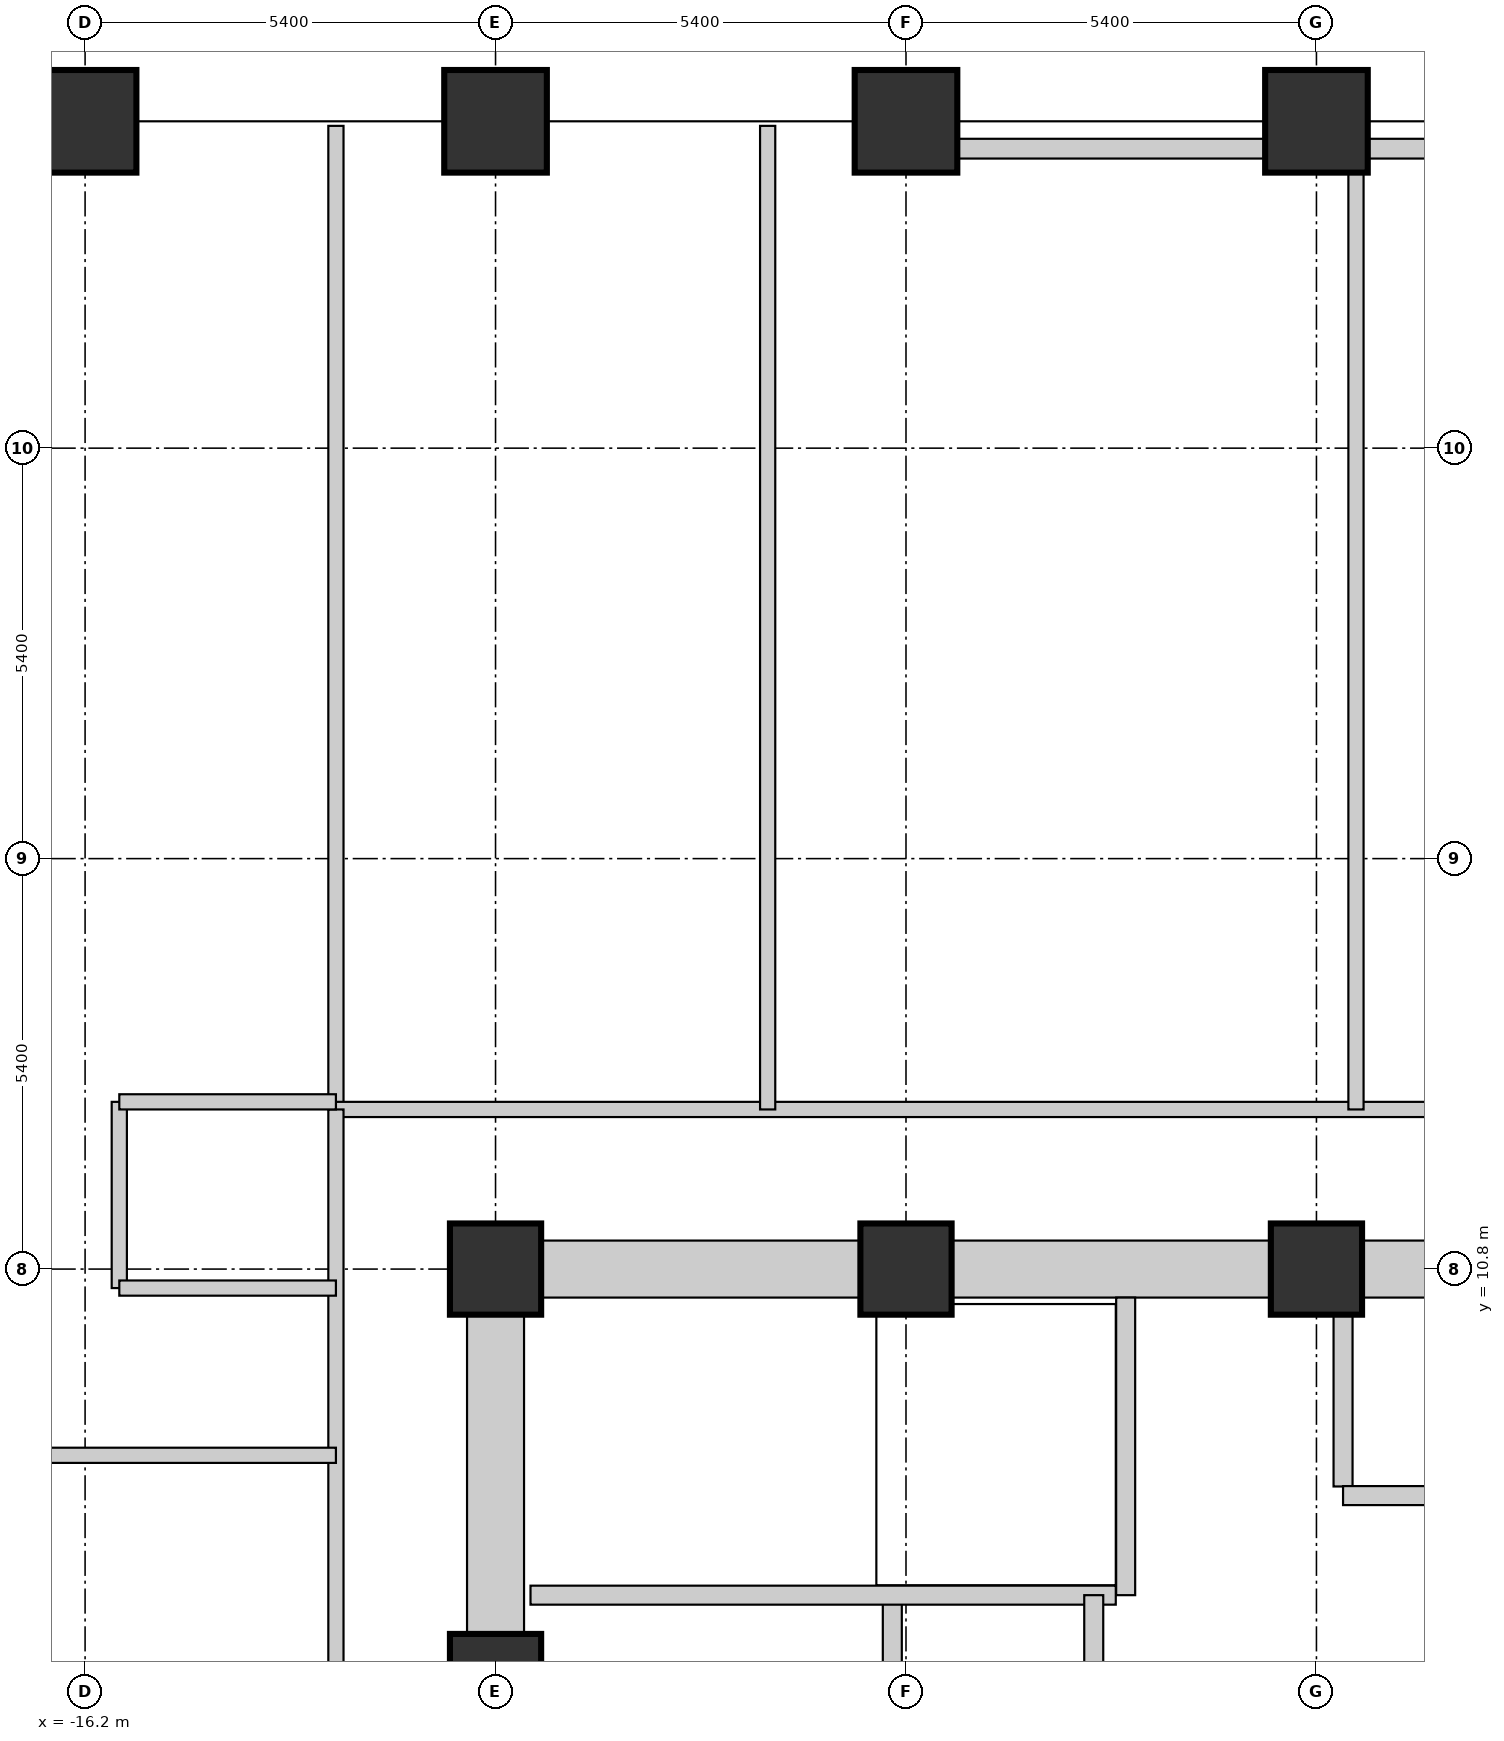
"""IFC4 building model, lengths in metres.
Left out: names, types, materials, properties, quantities, classifications, styles, units other than length and angle.
Written with IfcOpenShell. Run it as: python <this file> out.ifc"""

import sys

from ifc_helpers import new_model, si_unit, direction, frame, frame_2d, origin, origin_2d, place, context, subcontext, project, spatial, rectangle, extrude, element, fill, save


model = new_model("IFC4")
c1 = context("Model", 3, precision=1e-05, world=origin(), true_north=direction((0.0, 1.0)))
c2 = subcontext(c1, "Body", "Model", "MODEL_VIEW")
j1 = project(units=[si_unit("LENGTHUNIT", "METRE"), si_unit("PLANEANGLEUNIT", "RADIAN")], contexts=[c1])
p1 = place(None, origin())
s1 = spatial("IfcSite", under=j1, at=p1, CompositionType="ELEMENT")
p2 = place(p1, origin())
s2 = spatial("IfcBuilding", under=s1, at=p2, CompositionType="ELEMENT")
p3 = place(p2, frame((0.0, 0.0, 22.5)))
s3 = spatial("IfcBuildingStorey", under=s2, at=p3, CompositionType="ELEMENT", Elevation=22.5)
p4 = place(p3, frame((-16.2, 25.9, 0.0), z_axis=(0.0, 0.0, 1.0), x_axis=(1.0, 0.0, 0.0)))
e1 = element("IfcColumn", 1, at=p4, inside=s3, PredefinedType="COLUMN", context=c2, shape_type="SweptSolid", body=[
    extrude(rectangle(XDim=1.35, YDim=1.35, at=origin_2d()), origin(), (0.0, 0.0, 1.0), 3.75),
])
for number, where, z_axis, x_axis in (
    (2, (-10.8, 5.4, 0.0), (0.0, 0.0, 1.0), (1.0, 0.0, 0.0)),
    (3, (-10.8, 10.8, 0.0), (0.0, 0.0, 1.0), (1.0, 0.0, 0.0)),
):
    element("IfcColumn", number, at=place(p3, frame(where, z_axis=z_axis, x_axis=x_axis)), inside=s3, PredefinedType="COLUMN", context=c2, shape_type="SweptSolid", body=[
        extrude(rectangle(XDim=1.2, YDim=1.2, at=origin_2d()), origin(), (0.0, 0.0, 1.0), 3.75),
    ])
p5 = place(p3, frame((-10.8, 25.9, 0.0), z_axis=(0.0, 0.0, 1.0), x_axis=(1.0, 0.0, 0.0)))
e4 = element("IfcColumn", 4, at=p5, inside=s3, PredefinedType="COLUMN", context=c2, shape_type="SweptSolid", body=[
    extrude(rectangle(XDim=1.35, YDim=1.35, at=origin_2d()), origin(), (0.0, 0.0, 1.0), 3.75),
])
p6 = place(p3, frame((-5.4, 10.8, 0.0), z_axis=(0.0, 0.0, 1.0), x_axis=(1.0, 0.0, 0.0)))
e5 = element("IfcColumn", 5, at=p6, inside=s3, PredefinedType="COLUMN", context=c2, shape_type="SweptSolid", body=[
    extrude(rectangle(XDim=1.2, YDim=1.2, at=origin_2d()), origin(), (0.0, 0.0, 1.0), 3.75),
])
p7 = place(p3, frame((-5.4, 25.9, 0.0), z_axis=(0.0, 0.0, 1.0), x_axis=(1.0, 0.0, 0.0)))
e6 = element("IfcColumn", 6, at=p7, inside=s3, PredefinedType="COLUMN", context=c2, shape_type="SweptSolid", body=[
    extrude(rectangle(XDim=1.35, YDim=1.35, at=origin_2d()), origin(), (0.0, 0.0, 1.0), 3.75),
])
p8 = place(p3, frame((0.0, 10.8, 0.0), z_axis=(0.0, 0.0, 1.0), x_axis=(1.0, 0.0, 0.0)))
e7 = element("IfcColumn", 7, at=p8, inside=s3, PredefinedType="COLUMN", context=c2, shape_type="SweptSolid", body=[
    extrude(rectangle(XDim=1.2, YDim=1.2, at=origin_2d()), origin(), (0.0, 0.0, 1.0), 3.75),
])
p9 = place(p3, frame((0.0, 25.9, 0.0), z_axis=(0.0, 0.0, 1.0), x_axis=(1.0, 0.0, 0.0)))
e8 = element("IfcColumn", 8, at=p9, inside=s3, PredefinedType="COLUMN", context=c2, shape_type="SweptSolid", body=[
    extrude(rectangle(XDim=1.35, YDim=1.35, at=origin_2d()), origin(), (0.0, 0.0, 1.0), 3.75),
])
p10 = place(p3, frame((-10.19, 10.8, 0.0), z_axis=(0.0, 0.0, 1.0), x_axis=(1.0, 0.0, 0.0)))
e9 = element("IfcWall", 9, at=p10, inside=s3, PredefinedType="SHEAR", context=c2, shape_type="SweptSolid", body=[
    extrude(rectangle(XDim=4.18, YDim=0.75, at=frame_2d((2.09, 0.0))), origin(), (0.0, 0.0, 1.0), 3.75),
])
p11 = place(p3, frame((-4.79, 10.8, 0.0), z_axis=(0.0, 0.0, 1.0), x_axis=(1.0, 0.0, 0.0)))
e10 = element("IfcWall", 10, at=p11, inside=s3, PredefinedType="SHEAR", context=c2, shape_type="SweptSolid", body=[
    extrude(rectangle(XDim=4.18, YDim=0.75, at=frame_2d((2.09, 0.0))), origin(), (0.0, 0.0, 1.0), 3.75),
])
p12 = place(p11, frame((2.83, 0.0, 0.0)))
e11 = element("IfcOpeningElement", 11, at=p12, cuts=e10, PredefinedType="OPENING", context=c2, shape_type="SweptSolid", body=[
    extrude(rectangle(XDim=1.1, YDim=2.1, at=frame_2d((0.55, 1.05))), frame((0.0, 0.385, 0.0), z_axis=(0.0, -1.0, 0.0), x_axis=(1.0, 0.0, 0.0)), (0.0, 0.0, 1.0), 0.77),
])
for number, where, z_axis, x_axis in (
    (12, (0.61, 10.8, 0.0), (0.0, 0.0, 1.0), (1.0, 0.0, 0.0)),
    (13, (-10.8, 6.01, 0.0), (0.0, 0.0, 1.0), (0.0, 1.0, 0.0)),
):
    element("IfcWall", number, at=place(p3, frame(where, z_axis=z_axis, x_axis=x_axis)), inside=s3, PredefinedType="SHEAR", context=c2, shape_type="SweptSolid", body=[
        extrude(rectangle(XDim=4.18, YDim=0.75, at=frame_2d((2.09, 0.0))), origin(), (0.0, 0.0, 1.0), 3.75),
    ])
for number, where, z_axis, x_axis in (
    (14, (-0.673, 25.54, 0.0), (0.0, 0.0, 1.0), (-1.0, 0.0, 0.0)),
    (15, (4.727, 25.54, 0.0), (0.0, 0.0, 1.0), (-1.0, 0.0, 0.0)),
):
    element("IfcWall", number, at=place(p3, frame(where, z_axis=z_axis, x_axis=x_axis)), inside=s3, PredefinedType="STANDARD", context=c2, shape_type="SweptSolid", body=[
        extrude(rectangle(XDim=4.054, YDim=0.26, at=frame_2d((2.027, 0.0))), origin(), (0.0, 0.0, 1.0), 2.629),
    ])
p13 = place(p3, frame((-5.58, 0.72, 0.0), z_axis=(0.0, 0.0, 1.0), x_axis=(0.0, 1.0, 0.0)))
e16 = element("IfcWall", 16, at=p13, inside=s3, PredefinedType="SHEAR", context=c2, shape_type="SweptSolid", body=[
    extrude(rectangle(XDim=5.79, YDim=0.25, at=frame_2d((2.895, 0.0))), origin(), (0.0, 0.0, 1.0), 3.75),
])
p14 = place(p13, frame((3.35, 0.0, 0.0)))
e17 = element("IfcOpeningElement", 17, at=p14, cuts=e16, PredefinedType="OPENING", context=c2, shape_type="SweptSolid", body=[
    extrude(rectangle(XDim=1.1, YDim=2.1, at=frame_2d((0.55, 1.05))), frame((0.0, 0.135, 0.0), z_axis=(0.0, -1.0, 0.0), x_axis=(1.0, 0.0, 0.0)), (0.0, 0.0, 1.0), 0.27),
])
p15 = place(p3, frame((0.35, 7.94, 0.0), z_axis=(0.0, 0.0, 1.0), x_axis=(0.0, 1.0, 0.0)))
e18 = element("IfcWall", 18, at=p15, inside=s3, PredefinedType="SHEAR", context=c2, shape_type="SweptSolid", body=[
    extrude(rectangle(XDim=2.26, YDim=0.25, at=frame_2d((1.13, 0.0))), origin(), (0.0, 0.0, 1.0), 3.75),
])
p16 = place(p3, frame((0.35, 7.82, 0.0), z_axis=(0.0, 0.0, 1.0), x_axis=(1.0, 0.0, 0.0)))
e19 = element("IfcWall", 19, at=p16, inside=s3, PredefinedType="SHEAR", context=c2, shape_type="SweptSolid", body=[
    extrude(rectangle(XDim=10.075, YDim=0.25, at=frame_2d((5.038, 0.0))), origin(), (0.0, 0.0, 1.0), 3.75),
])
p17 = place(p16, frame((0.7, 0.0, 0.0)))
e20 = element("IfcOpeningElement", 20, at=p17, cuts=e19, PredefinedType="OPENING", context=c2, shape_type="SweptSolid", body=[
    extrude(rectangle(XDim=1.1, YDim=2.1, at=frame_2d((0.55, 1.05))), frame((0.0, 0.135, 0.0), z_axis=(0.0, -1.0, 0.0), x_axis=(1.0, 0.0, 0.0)), (0.0, 0.0, 1.0), 0.27),
])
p18 = place(p16, frame((3.2, 0.0, 0.0)))
e21 = element("IfcOpeningElement", 21, at=p18, cuts=e19, PredefinedType="OPENING", context=c2, shape_type="SweptSolid", body=[
    extrude(rectangle(XDim=1.1, YDim=2.1, at=frame_2d((0.55, 1.05))), frame((0.0, 0.135, 0.0), z_axis=(0.0, -1.0, 0.0), x_axis=(1.0, 0.0, 0.0)), (0.0, 0.0, 1.0), 0.27),
])
p19 = place(p16, frame((5.7, 0.0, 0.0)))
e22 = element("IfcOpeningElement", 22, at=p19, cuts=e19, PredefinedType="OPENING", context=c2, shape_type="SweptSolid", body=[
    extrude(rectangle(XDim=1.1, YDim=2.1, at=frame_2d((0.55, 1.05))), frame((0.0, 0.135, 0.0), z_axis=(0.0, -1.0, 0.0), x_axis=(1.0, 0.0, 0.0)), (0.0, 0.0, 1.0), 0.27),
])
p20 = place(p16, frame((8.2, 0.0, 0.0)))
e23 = element("IfcOpeningElement", 23, at=p20, cuts=e19, PredefinedType="OPENING", context=c2, shape_type="SweptSolid", body=[
    extrude(rectangle(XDim=1.1, YDim=2.1, at=frame_2d((0.55, 1.05))), frame((0.0, 0.135, 0.0), z_axis=(0.0, -1.0, 0.0), x_axis=(1.0, 0.0, 0.0)), (0.0, 0.0, 1.0), 0.27),
])
p21 = place(p3, frame((-2.51, 6.51, 0.0), z_axis=(0.0, 0.0, 1.0), x_axis=(0.0, 1.0, 0.0)))
e24 = element("IfcWall", 24, at=p21, inside=s3, PredefinedType="SHEAR", context=c2, shape_type="SweptSolid", body=[
    extrude(rectangle(XDim=3.915, YDim=0.25, at=frame_2d((1.958, 0.0))), origin(), (0.0, 0.0, 1.0), 3.75),
])
p22 = place(p3, frame((-10.34, 6.51, 0.0), z_axis=(0.0, 0.0, 1.0), x_axis=(1.0, 0.0, 0.0)))
e25 = element("IfcWall", 25, at=p22, inside=s3, PredefinedType="SHEAR", context=c2, shape_type="SweptSolid", body=[
    extrude(rectangle(XDim=7.7, YDim=0.25, at=frame_2d((3.85, 0.0))), origin(), (0.0, 0.0, 1.0), 3.75),
])
p23 = place(p22, frame((0.35, 0.0, 0.0)))
e26 = element("IfcOpeningElement", 26, at=p23, cuts=e25, PredefinedType="OPENING", context=c2, shape_type="SweptSolid", body=[
    extrude(rectangle(XDim=1.1, YDim=2.1, at=frame_2d((0.55, 1.05))), frame((0.0, 0.135, 0.0), z_axis=(0.0, -1.0, 0.0), x_axis=(1.0, 0.0, 0.0)), (0.0, 0.0, 1.0), 0.27),
])
p24 = place(p3, frame((-2.93, 0.68, 0.0), z_axis=(0.0, 0.0, 1.0), x_axis=(0.0, 1.0, 0.0)))
e27 = element("IfcWall", 27, at=p24, inside=s3, PredefinedType="SHEAR", context=c2, shape_type="SweptSolid", body=[
    extrude(rectangle(XDim=5.83, YDim=0.25, at=frame_2d((2.915, 0.0))), origin(), (0.0, 0.0, 1.0), 3.75),
])
p25 = place(p24, frame((0.75, 0.0, 0.0)))
e28 = element("IfcOpeningElement", 28, at=p25, cuts=e27, PredefinedType="OPENING", context=c2, shape_type="SweptSolid", body=[
    extrude(rectangle(XDim=1.2, YDim=2.1, at=frame_2d((0.6, 1.05))), frame((0.0, 0.135, 0.0), z_axis=(0.0, -1.0, 0.0), x_axis=(1.0, 0.0, 0.0)), (0.0, 0.0, 1.0), 0.27),
])
p26 = place(p3, frame((-12.9, 12.9, 0.0), z_axis=(0.0, 0.0, 1.0), x_axis=(0.0, 1.0, 0.0)))
e29 = element("IfcWall", 29, at=p26, inside=s3, PredefinedType="PARTITIONING", context=c2, shape_type="SweptSolid", body=[
    extrude(rectangle(XDim=12.94, YDim=0.2, at=frame_2d((6.47, 0.0))), origin(), (0.0, 0.0, 1.0), 2.629),
])
p27 = place(p3, frame((-12.9, 12.9, 0.0), z_axis=(0.0, 0.0, 1.0), x_axis=(1.0, 0.0, 0.0)))
e30 = element("IfcWall", 30, at=p27, inside=s3, PredefinedType="PARTITIONING", context=c2, shape_type="SweptSolid", body=[
    extrude(rectangle(XDim=25.8, YDim=0.2, at=frame_2d((12.9, 0.0))), origin(), (0.0, 0.0, 1.0), 2.93),
])
p28 = place(p27, frame((4.347, 0.0, 0.0)))
e31 = element("IfcOpeningElement", 31, at=p28, cuts=e30, PredefinedType="OPENING", context=c2, shape_type="SweptSolid", body=[
    extrude(rectangle(XDim=0.85, YDim=2.1, at=frame_2d((0.425, 1.05))), frame((0.0, 0.11, 0.0), z_axis=(0.0, -1.0, 0.0), x_axis=(1.0, 0.0, 0.0)), (0.0, 0.0, 1.0), 0.22),
])
p29 = place(p27, frame((9.1, 0.0, 0.0)))
e32 = element("IfcOpeningElement", 32, at=p29, cuts=e30, PredefinedType="OPENING", context=c2, shape_type="SweptSolid", body=[
    extrude(rectangle(XDim=0.85, YDim=2.1, at=frame_2d((0.425, 1.05))), frame((0.0, 0.11, 0.0), z_axis=(0.0, -1.0, 0.0), x_axis=(1.0, 0.0, 0.0)), (0.0, 0.0, 1.0), 0.22),
])
p30 = place(p27, frame((19.16, 0.0, 0.0)))
e33 = element("IfcOpeningElement", 33, at=p30, cuts=e30, PredefinedType="OPENING", context=c2, shape_type="SweptSolid", body=[
    extrude(rectangle(XDim=0.95, YDim=2.1, at=frame_2d((0.475, 1.05))), frame((0.0, 0.11, 0.0), z_axis=(0.0, -1.0, 0.0), x_axis=(1.0, 0.0, 0.0)), (0.0, 0.0, 1.0), 0.22),
])
p31 = place(p3, frame((-12.9, -12.9, 0.0), z_axis=(0.0, 0.0, 1.0), x_axis=(0.0, 1.0, 0.0)))
e34 = element("IfcWall", 34, at=p31, inside=s3, PredefinedType="PARTITIONING", context=c2, shape_type="SweptSolid", body=[
    extrude(rectangle(XDim=25.8, YDim=0.2, at=frame_2d((12.9, 0.0))), origin(), (0.0, 0.0, 1.0), 3.57),
])
p32 = place(p31, frame((0.28, 0.0, 0.0)))
e35 = element("IfcOpeningElement", 35, at=p32, cuts=e34, PredefinedType="OPENING", context=c2, shape_type="SweptSolid", body=[
    extrude(rectangle(XDim=0.95, YDim=2.1, at=frame_2d((0.475, 1.05))), frame((0.0, 0.11, 0.0), z_axis=(0.0, -1.0, 0.0), x_axis=(1.0, 0.0, 0.0)), (0.0, 0.0, 1.0), 0.22),
])
p33 = place(p31, frame((24.205, 0.0, 0.0)))
e36 = element("IfcOpeningElement", 36, at=p33, cuts=e34, PredefinedType="OPENING", context=c2, shape_type="SweptSolid", body=[
    extrude(rectangle(XDim=0.85, YDim=2.1, at=frame_2d((0.425, 1.05))), frame((0.0, 0.11, 0.0), z_axis=(0.0, -1.0, 0.0), x_axis=(1.0, 0.0, 0.0)), (0.0, 0.0, 1.0), 0.22),
])
p34 = place(p31, frame((21.87, 0.0, 0.0)))
e37 = element("IfcOpeningElement", 37, at=p34, cuts=e34, PredefinedType="OPENING", context=c2, shape_type="SweptSolid", body=[
    extrude(rectangle(XDim=0.95, YDim=2.1, at=frame_2d((0.475, 1.05))), frame((0.0, 0.11, 0.0), z_axis=(0.0, -1.0, 0.0), x_axis=(1.0, 0.0, 0.0)), (0.0, 0.0, 1.0), 0.22),
])
p35 = place(p31, frame((5.16, 0.0, 0.0)))
e38 = element("IfcOpeningElement", 38, at=p35, cuts=e34, PredefinedType="OPENING", context=c2, shape_type="SweptSolid", body=[
    extrude(rectangle(XDim=0.95, YDim=2.1, at=frame_2d((0.475, 1.05))), frame((0.0, 0.11, 0.0), z_axis=(0.0, -1.0, 0.0), x_axis=(1.0, 0.0, 0.0)), (0.0, 0.0, 1.0), 0.22),
])
p36 = place(p31, frame((10.785, 0.0, 0.0)))
e39 = element("IfcOpeningElement", 39, at=p36, cuts=e34, PredefinedType="OPENING", context=c2, shape_type="SweptSolid", body=[
    extrude(rectangle(XDim=0.95, YDim=2.1, at=frame_2d((0.475, 1.05))), frame((0.0, 0.11, 0.0), z_axis=(0.0, -1.0, 0.0), x_axis=(1.0, 0.0, 0.0)), (0.0, 0.0, 1.0), 0.22),
])
p37 = place(p31, frame((15.045, 0.0, 0.0)))
e40 = element("IfcOpeningElement", 40, at=p37, cuts=e34, PredefinedType="OPENING", context=c2, shape_type="SweptSolid", body=[
    extrude(rectangle(XDim=0.95, YDim=2.1, at=frame_2d((0.475, 1.05))), frame((0.0, 0.11, 0.0), z_axis=(0.0, -1.0, 0.0), x_axis=(1.0, 0.0, 0.0)), (0.0, 0.0, 1.0), 0.22),
])
for number, where, z_axis, x_axis in (
    (41, (-7.22, 12.9, 0.0), (0.0, 0.0, 1.0), (0.0, 1.0, 0.0)),
    (42, (0.52, 12.9, 0.0), (0.0, 0.0, 1.0), (0.0, 1.0, 0.0)),
):
    element("IfcWall", number, at=place(p3, frame(where, z_axis=z_axis, x_axis=x_axis)), inside=s3, PredefinedType="PARTITIONING", context=c2, shape_type="SweptSolid", body=[
        extrude(rectangle(XDim=12.94, YDim=0.2, at=frame_2d((6.47, 0.0))), origin(), (0.0, 0.0, 1.0), 2.629),
    ])
p38 = place(p3, frame((-15.75, 10.55, 0.0), z_axis=(0.0, 0.0, 1.0), x_axis=(0.0, 1.0, 0.0)))
e43 = element("IfcWall", 43, at=p38, inside=s3, PredefinedType="PARTITIONING", context=c2, shape_type="SweptSolid", body=[
    extrude(rectangle(XDim=2.45, YDim=0.2, at=frame_2d((1.225, 0.0))), origin(), (0.0, 0.0, 1.0), 3.57),
])
for number, where, z_axis, x_axis in (
    (44, (-15.75, 13.0, 0.0), (0.0, 0.0, 1.0), (1.0, 0.0, 0.0)),
    (45, (-15.75, 10.55, 0.0), (0.0, 0.0, 1.0), (1.0, 0.0, 0.0)),
):
    element("IfcWall", number, at=place(p3, frame(where, z_axis=z_axis, x_axis=x_axis)), inside=s3, PredefinedType="PARTITIONING", context=c2, shape_type="SweptSolid", body=[
        extrude(rectangle(XDim=2.85, YDim=0.2, at=frame_2d((1.425, 0.0))), origin(), (0.0, 0.0, 1.0), 3.57),
    ])
p39 = place(p3, frame((-32.34, 8.35, 0.0), z_axis=(0.0, 0.0, 1.0), x_axis=(1.0, 0.0, 0.0)))
e46 = element("IfcWall", 46, at=p39, inside=s3, PredefinedType="PARTITIONING", context=c2, shape_type="SweptSolid", body=[
    extrude(rectangle(XDim=19.44, YDim=0.2, at=frame_2d((9.72, 0.0))), origin(), (0.0, 0.0, 1.0), 2.629),
])
p40 = place(p23, origin())
e47 = element("IfcDoor", 47, at=p40, inside=s3, OperationType="SINGLE_SWING_LEFT", PredefinedType="DOOR", context=c2, shape_type="SweptSolid", body=[
    extrude(rectangle(XDim=1.1, YDim=2.1, at=frame_2d((0.55, 1.05))), frame((0.0, 0.025, 0.0), z_axis=(0.0, -1.0, 0.0), x_axis=(1.0, 0.0, 0.0)), (0.0, 0.0, 1.0), 0.05),
])
fill(e26, e47)
p41 = place(p12, origin())
e48 = element("IfcDoor", 48, at=p41, inside=s3, OperationType="SINGLE_SWING_LEFT", PredefinedType="DOOR", context=c2, shape_type="SweptSolid", body=[
    extrude(rectangle(XDim=1.1, YDim=2.1, at=frame_2d((0.55, 1.05))), frame((0.0, 0.025, 0.0), z_axis=(0.0, -1.0, 0.0), x_axis=(1.0, 0.0, 0.0)), (0.0, 0.0, 1.0), 0.05),
])
fill(e11, e48)
p42 = place(p17, origin())
e49 = element("IfcDoor", 49, at=p42, inside=s3, OperationType="SLIDING_TO_LEFT", PredefinedType="DOOR", context=c2, shape_type="SweptSolid", body=[
    extrude(rectangle(XDim=1.1, YDim=2.1, at=frame_2d((0.55, 1.05))), frame((0.0, 0.025, 0.0), z_axis=(0.0, -1.0, 0.0), x_axis=(1.0, 0.0, 0.0)), (0.0, 0.0, 1.0), 0.05),
])
fill(e20, e49)
p43 = place(p33, origin())
e50 = element("IfcDoor", 50, at=p43, inside=s3, OperationType="SINGLE_SWING_LEFT", PredefinedType="DOOR", context=c2, shape_type="SweptSolid", body=[
    extrude(rectangle(XDim=0.85, YDim=2.1, at=frame_2d((0.425, 1.05))), frame((0.0, 0.025, 0.0), z_axis=(0.0, -1.0, 0.0), x_axis=(1.0, 0.0, 0.0)), (0.0, 0.0, 1.0), 0.05),
])
fill(e36, e50)
p44 = place(p34, origin())
e51 = element("IfcDoor", 51, at=p44, inside=s3, OperationType="SINGLE_SWING_RIGHT", PredefinedType="DOOR", context=c2, shape_type="SweptSolid", body=[
    extrude(rectangle(XDim=0.95, YDim=2.1, at=frame_2d((0.475, 1.05))), frame((0.0, 0.025, 0.0), z_axis=(0.0, -1.0, 0.0), x_axis=(1.0, 0.0, 0.0)), (0.0, 0.0, 1.0), 0.05),
])
fill(e37, e51)
p45 = place(p28, origin())
e52 = element("IfcDoor", 52, at=p45, inside=s3, OperationType="SINGLE_SWING_RIGHT", PredefinedType="DOOR", context=c2, shape_type="SweptSolid", body=[
    extrude(rectangle(XDim=0.85, YDim=2.1, at=frame_2d((0.425, 1.05))), frame((0.0, 0.025, 0.0), z_axis=(0.0, -1.0, 0.0), x_axis=(1.0, 0.0, 0.0)), (0.0, 0.0, 1.0), 0.05),
])
fill(e31, e52)
p46 = place(p29, origin())
e53 = element("IfcDoor", 53, at=p46, inside=s3, OperationType="SINGLE_SWING_LEFT", PredefinedType="DOOR", context=c2, shape_type="SweptSolid", body=[
    extrude(rectangle(XDim=0.85, YDim=2.1, at=frame_2d((0.425, 1.05))), frame((0.0, 0.025, 0.0), z_axis=(0.0, -1.0, 0.0), x_axis=(1.0, 0.0, 0.0)), (0.0, 0.0, 1.0), 0.05),
])
fill(e32, e53)
save(model, sys.argv[1])
